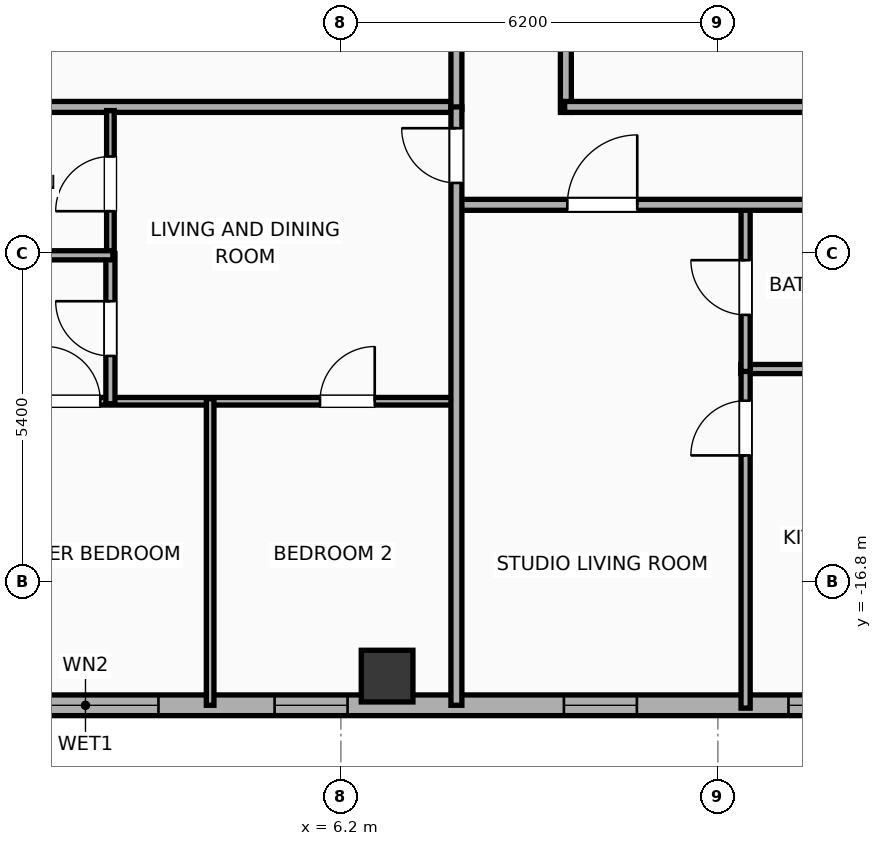
"""IFC4 building model, lengths in metres.
Left out: names, types, materials, properties, quantities, classifications, styles, units other than length and angle.
Written with IfcOpenShell. Run it as: python <this file> out.ifc"""

import sys

from ifc_helpers import new_model, si_unit, direction, frame, frame_2d, origin, origin_2d, place, context, subcontext, project, spatial, rectangle, hollow_rectangle, extrude, element, fill, save


model = new_model("IFC4")
c1 = context("Model", 3, precision=1e-05, world=origin(), true_north=direction((0.0, 1.0)))
c2 = subcontext(c1, "Body", "Model", "MODEL_VIEW")
j1 = project(units=[si_unit("LENGTHUNIT", "METRE"), si_unit("PLANEANGLEUNIT", "RADIAN")], contexts=[c1])
p1 = place(None, origin())
s1 = spatial("IfcSite", under=j1, at=p1, CompositionType="ELEMENT")
p2 = place(p1, origin())
s2 = spatial("IfcBuilding", under=s1, at=p2, CompositionType="ELEMENT")
p3 = place(p2, frame((0.0, 0.0, 247.0)))
s3 = spatial("IfcBuildingStorey", under=s2, at=p3, CompositionType="ELEMENT", Elevation=247.0)
p4 = place(p3, frame((6.96, -18.35, 0.0), z_axis=(0.0, 0.0, 1.0), x_axis=(1.0, 0.0, 0.0)))
e1 = element("IfcColumn", 1, at=p4, inside=s3, PredefinedType="COLUMN", context=c2, shape_type="SweptSolid", body=[
    extrude(hollow_rectangle(XDim=0.85, YDim=0.85, WallThickness=0.028, at=origin_2d()), origin(), (0.0, 0.0, 1.0), 3.9),
])
p5 = place(p3, frame((26.783, -18.83, 0.0), z_axis=(0.0, 0.0, 1.0), x_axis=(-1.0, 0.0, 0.0)))
e2 = element("IfcWall", 2, at=p5, inside=s3, PredefinedType="ELEMENTEDWALL", context=c2, shape_type="SweptSolid", body=[
    extrude(rectangle(XDim=49.566, YDim=0.34, at=frame_2d((24.783, 0.0))), origin(), (0.0, 0.0, 1.0), 3.65),
])
p6 = place(p5, frame((23.583, 0.0, 0.75)))
e3 = element("IfcOpeningElement", 3, at=p6, cuts=e2, PredefinedType="OPENING", context=c2, shape_type="SweptSolid", body=[
    extrude(rectangle(XDim=2.4, YDim=2.1, at=frame_2d((1.2, 1.05))), frame((0.0, 0.18, 0.0), z_axis=(0.0, -1.0, 0.0), x_axis=(1.0, 0.0, 0.0)), (0.0, 0.0, 1.0), 0.36),
])
p7 = place(p5, frame((41.756, 0.0, 0.75)))
e4 = element("IfcOpeningElement", 4, at=p7, cuts=e2, PredefinedType="OPENING", context=c2, shape_type="SweptSolid", body=[
    extrude(rectangle(XDim=2.4, YDim=2.1, at=frame_2d((1.2, 1.05))), frame((0.0, 0.18, 0.0), z_axis=(0.0, -1.0, 0.0), x_axis=(1.0, 0.0, 0.0)), (0.0, 0.0, 1.0), 0.36),
])
p8 = place(p5, frame((47.222, 0.0, 0.75)))
e5 = element("IfcOpeningElement", 5, at=p8, cuts=e2, PredefinedType="OPENING", context=c2, shape_type="SweptSolid", body=[
    extrude(rectangle(XDim=1.2, YDim=2.05, at=frame_2d((0.6, 1.025))), frame((0.0, 0.18, 0.0), z_axis=(0.0, -1.0, 0.0), x_axis=(1.0, 0.0, 0.0)), (0.0, 0.0, 1.0), 0.36),
])
p9 = place(p5, frame((45.131, 0.0, 0.75)))
e6 = element("IfcOpeningElement", 6, at=p9, cuts=e2, PredefinedType="OPENING", context=c2, shape_type="SweptSolid", body=[
    extrude(rectangle(XDim=1.2, YDim=2.05, at=frame_2d((0.6, 1.025))), frame((0.0, 0.18, 0.0), z_axis=(0.0, -1.0, 0.0), x_axis=(1.0, 0.0, 0.0)), (0.0, 0.0, 1.0), 0.36),
])
p10 = place(p5, frame((37.289, 0.0, 0.75)))
e7 = element("IfcOpeningElement", 7, at=p10, cuts=e2, PredefinedType="OPENING", context=c2, shape_type="SweptSolid", body=[
    extrude(rectangle(XDim=1.2, YDim=2.05, at=frame_2d((0.6, 1.025))), frame((0.0, 0.18, 0.0), z_axis=(0.0, -1.0, 0.0), x_axis=(1.0, 0.0, 0.0)), (0.0, 0.0, 1.0), 0.36),
])
p11 = place(p5, frame((15.715, 0.0, 0.75)))
e8 = element("IfcOpeningElement", 8, at=p11, cuts=e2, PredefinedType="OPENING", context=c2, shape_type="SweptSolid", body=[
    extrude(rectangle(XDim=1.2, YDim=2.05, at=frame_2d((0.6, 1.025))), frame((0.0, 0.18, 0.0), z_axis=(0.0, -1.0, 0.0), x_axis=(1.0, 0.0, 0.0)), (0.0, 0.0, 1.0), 0.36),
])
p12 = place(p5, frame((12.022, 0.0, 0.75)))
e9 = element("IfcOpeningElement", 9, at=p12, cuts=e2, PredefinedType="OPENING", context=c2, shape_type="SweptSolid", body=[
    extrude(rectangle(XDim=1.2, YDim=2.05, at=frame_2d((0.6, 1.025))), frame((0.0, 0.18, 0.0), z_axis=(0.0, -1.0, 0.0), x_axis=(1.0, 0.0, 0.0)), (0.0, 0.0, 1.0), 0.36),
])
p13 = place(p5, frame((8.09, 0.0, 0.75)))
e10 = element("IfcOpeningElement", 10, at=p13, cuts=e2, PredefinedType="OPENING", context=c2, shape_type="SweptSolid", body=[
    extrude(rectangle(XDim=1.2, YDim=2.05, at=frame_2d((0.6, 1.025))), frame((0.0, 0.18, 0.0), z_axis=(0.0, -1.0, 0.0), x_axis=(1.0, 0.0, 0.0)), (0.0, 0.0, 1.0), 0.36),
])
p14 = place(p5, frame((4.637, 0.0, 0.75)))
e11 = element("IfcOpeningElement", 11, at=p14, cuts=e2, PredefinedType="OPENING", context=c2, shape_type="SweptSolid", body=[
    extrude(rectangle(XDim=1.2, YDim=2.05, at=frame_2d((0.6, 1.025))), frame((0.0, 0.18, 0.0), z_axis=(0.0, -1.0, 0.0), x_axis=(1.0, 0.0, 0.0)), (0.0, 0.0, 1.0), 0.36),
])
p15 = place(p5, frame((1.811, 0.0, 0.75)))
e12 = element("IfcOpeningElement", 12, at=p15, cuts=e2, PredefinedType="OPENING", context=c2, shape_type="SweptSolid", body=[
    extrude(rectangle(XDim=1.2, YDim=2.05, at=frame_2d((0.6, 1.025))), frame((0.0, 0.18, 0.0), z_axis=(0.0, -1.0, 0.0), x_axis=(1.0, 0.0, 0.0)), (0.0, 0.0, 1.0), 0.36),
])
p16 = place(p5, frame((32.253, 0.0, 0.75)))
e13 = element("IfcOpeningElement", 13, at=p16, cuts=e2, PredefinedType="OPENING", context=c2, shape_type="SweptSolid", body=[
    extrude(rectangle(XDim=1.2, YDim=2.05, at=frame_2d((0.6, 1.025))), frame((0.0, 0.18, 0.0), z_axis=(0.0, -1.0, 0.0), x_axis=(1.0, 0.0, 0.0)), (0.0, 0.0, 1.0), 0.36),
])
p17 = place(p5, frame((27.853, 0.0, 0.75)))
e14 = element("IfcOpeningElement", 14, at=p17, cuts=e2, PredefinedType="OPENING", context=c2, shape_type="SweptSolid", body=[
    extrude(rectangle(XDim=1.2, YDim=2.05, at=frame_2d((0.6, 1.025))), frame((0.0, 0.18, 0.0), z_axis=(0.0, -1.0, 0.0), x_axis=(1.0, 0.0, 0.0)), (0.0, 0.0, 1.0), 0.36),
])
p18 = place(p5, frame((20.473, 0.0, 0.75)))
e15 = element("IfcOpeningElement", 15, at=p18, cuts=e2, PredefinedType="OPENING", context=c2, shape_type="SweptSolid", body=[
    extrude(rectangle(XDim=1.2, YDim=2.05, at=frame_2d((0.6, 1.025))), frame((0.0, 0.18, 0.0), z_axis=(0.0, -1.0, 0.0), x_axis=(1.0, 0.0, 0.0)), (0.0, 0.0, 1.0), 0.36),
])
p19 = place(p3, frame((9.9, -9.08, 0.0), z_axis=(0.0, 0.0, 1.0), x_axis=(0.0, 1.0, 0.0)))
e16 = element("IfcWall", 16, at=p19, inside=s3, PredefinedType="PARTITIONING", context=c2, shape_type="SweptSolid", body=[
    extrude(rectangle(XDim=18.16, YDim=0.18, at=frame_2d((9.08, 0.0))), origin(), (0.0, 0.0, 1.0), 3.65),
])
p20 = place(p19, frame((7.622, 0.0, 0.0)))
e17 = element("IfcOpeningElement", 17, at=p20, cuts=e16, PredefinedType="OPENING", context=c2, shape_type="SweptSolid", body=[
    extrude(rectangle(XDim=1.1, YDim=2.05, at=frame_2d((0.55, 1.025))), frame((0.0, 0.1, 0.0), z_axis=(0.0, -1.0, 0.0), x_axis=(1.0, 0.0, 0.0)), (0.0, 0.0, 1.0), 0.2),
])
p21 = place(p3, frame((9.88, -8.99, 0.0), z_axis=(0.0, 0.0, 1.0), x_axis=(1.0, 0.0, 0.0)))
e18 = element("IfcWall", 18, at=p21, inside=s3, PredefinedType="PARTITIONING", context=c2, shape_type="SweptSolid", body=[
    extrude(rectangle(XDim=20.35, YDim=0.18, at=frame_2d((10.175, 0.0))), origin(), (0.0, 0.0, 1.0), 3.65),
])
p22 = place(p3, frame((-8.15, -8.99, 0.0), z_axis=(0.0, 0.0, 1.0), x_axis=(1.0, 0.0, 0.0)))
e19 = element("IfcWall", 19, at=p22, inside=s3, PredefinedType="PARTITIONING", context=c2, shape_type="SweptSolid", body=[
    extrude(rectangle(XDim=16.3, YDim=0.18, at=frame_2d((8.15, 0.0))), origin(), (0.0, 0.0, 1.0), 3.65),
])
p23 = place(p3, frame((8.1, -9.03, 0.0), z_axis=(0.0, 0.0, 1.0), x_axis=(0.0, 1.0, 0.0)))
e20 = element("IfcWall", 20, at=p23, inside=s3, PredefinedType="PARTITIONING", context=c2, shape_type="SweptSolid", body=[
    extrude(rectangle(XDim=18.06, YDim=0.18, at=frame_2d((9.03, 0.0))), origin(), (0.0, 0.0, 1.0), 3.65),
])
p24 = place(p3, frame((12.776, -13.3, 0.0), z_axis=(0.0, 0.0, 1.0), x_axis=(1.0, 0.0, 0.0)))
e21 = element("IfcWall", 21, at=p24, inside=s3, PredefinedType="PLUMBINGWALL", context=c2, shape_type="SweptSolid", body=[
    extrude(rectangle(XDim=2.95, YDim=0.15, at=frame_2d((1.475, 0.0))), origin(), (0.0, 0.0, 1.0), 3.65),
])
p25 = place(p3, frame((12.856, -18.877, 0.0), z_axis=(0.0, 0.0, 1.0), x_axis=(0.0, 1.0, 0.0)))
e22 = element("IfcWall", 22, at=p25, inside=s3, PredefinedType="PLUMBINGWALL", context=c2, shape_type="SweptSolid", body=[
    extrude(rectangle(XDim=5.617, YDim=0.15, at=frame_2d((2.808, 0.0))), origin(), (0.0, 0.0, 1.0), 3.65),
])
p26 = place(p25, frame((4.156, 0.0, 0.0)))
e23 = element("IfcOpeningElement", 23, at=p26, cuts=e22, PredefinedType="OPENING", context=c2, shape_type="SweptSolid", body=[
    extrude(rectangle(XDim=0.9, YDim=2.05, at=frame_2d((0.45, 1.025))), frame((0.0, 0.085, 0.0), z_axis=(0.0, -1.0, 0.0), x_axis=(1.0, 0.0, 0.0)), (0.0, 0.0, 1.0), 0.17),
])
p27 = place(p3, frame((12.856, -13.34, 0.0), z_axis=(0.0, 0.0, 1.0), x_axis=(0.0, 1.0, 0.0)))
e24 = element("IfcWall", 24, at=p27, inside=s3, PredefinedType="PLUMBINGWALL", context=c2, shape_type="SweptSolid", body=[
    extrude(rectangle(XDim=2.76, YDim=0.15, at=frame_2d((1.38, 0.0))), origin(), (0.0, 0.0, 1.0), 3.65),
])
p28 = place(p27, frame((0.93, 0.0, 0.0)))
e25 = element("IfcOpeningElement", 25, at=p28, cuts=e24, PredefinedType="OPENING", context=c2, shape_type="SweptSolid", body=[
    extrude(rectangle(XDim=0.9, YDim=2.05, at=frame_2d((0.45, 1.025))), frame((0.0, 0.085, 0.0), z_axis=(0.0, -1.0, 0.0), x_axis=(1.0, 0.0, 0.0)), (0.0, 0.0, 1.0), 0.17),
])
p29 = place(p3, frame((8.08, -10.6, 0.0), z_axis=(0.0, 0.0, 1.0), x_axis=(1.0, 0.0, 0.0)))
e26 = element("IfcWall", 26, at=p29, inside=s3, PredefinedType="PARTITIONING", context=c2, shape_type="SweptSolid", body=[
    extrude(rectangle(XDim=22.15, YDim=0.18, at=frame_2d((11.075, 0.0))), origin(), (0.0, 0.0, 1.0), 3.65),
])
p30 = place(p29, frame((1.844, 0.0, 0.0)))
e27 = element("IfcOpeningElement", 27, at=p30, cuts=e26, PredefinedType="OPENING", context=c2, shape_type="SweptSolid", body=[
    extrude(rectangle(XDim=1.15, YDim=2.05, at=frame_2d((0.575, 1.025))), frame((0.0, 0.1, 0.0), z_axis=(0.0, -1.0, 0.0), x_axis=(1.0, 0.0, 0.0)), (0.0, 0.0, 1.0), 0.2),
])
p31 = place(p29, frame((9.229, 0.0, 0.0)))
e28 = element("IfcOpeningElement", 28, at=p31, cuts=e26, PredefinedType="OPENING", context=c2, shape_type="SweptSolid", body=[
    extrude(rectangle(XDim=1.15, YDim=2.05, at=frame_2d((0.575, 1.025))), frame((0.0, 0.1, 0.0), z_axis=(0.0, -1.0, 0.0), x_axis=(1.0, 0.0, 0.0)), (0.0, 0.0, 1.0), 0.2),
])
p32 = place(p29, frame((18.191, 0.0, 0.0)))
e29 = element("IfcOpeningElement", 29, at=p32, cuts=e26, PredefinedType="OPENING", context=c2, shape_type="SweptSolid", body=[
    extrude(rectangle(XDim=0.9, YDim=2.05, at=frame_2d((0.45, 1.025))), frame((0.0, 0.1, 0.0), z_axis=(0.0, -1.0, 0.0), x_axis=(1.0, 0.0, 0.0)), (0.0, 0.0, 1.0), 0.2),
])
p33 = place(p3, frame((0.02, -13.83, 0.0), z_axis=(0.0, 0.0, 1.0), x_axis=(1.0, 0.0, 0.0)))
e30 = element("IfcWall", 30, at=p33, inside=s3, PredefinedType="PARTITIONING", context=c2, shape_type="SweptSolid", body=[
    extrude(rectangle(XDim=8.06, YDim=0.125, at=frame_2d((4.03, 0.0))), origin(), (0.0, 0.0, 1.0), 3.65),
])
p34 = place(p33, frame((1.323, 0.0, 0.0)))
e31 = element("IfcOpeningElement", 31, at=p34, cuts=e30, PredefinedType="OPENING", context=c2, shape_type="SweptSolid", body=[
    extrude(rectangle(XDim=0.9, YDim=2.05, at=frame_2d((0.45, 1.025))), frame((0.0, 0.073, 0.0), z_axis=(0.0, -1.0, 0.0), x_axis=(1.0, 0.0, 0.0)), (0.0, 0.0, 1.0), 0.145),
])
p35 = place(p33, frame((5.837, 0.0, 0.0)))
e32 = element("IfcOpeningElement", 32, at=p35, cuts=e30, PredefinedType="OPENING", context=c2, shape_type="SweptSolid", body=[
    extrude(rectangle(XDim=0.9, YDim=2.05, at=frame_2d((0.45, 1.025))), frame((0.0, 0.073, 0.0), z_axis=(0.0, -1.0, 0.0), x_axis=(1.0, 0.0, 0.0)), (0.0, 0.0, 1.0), 0.145),
])
p36 = place(p3, frame((2.41, -11.46, 0.0), z_axis=(0.0, 0.0, 1.0), x_axis=(0.0, 1.0, 0.0)))
e33 = element("IfcWall", 33, at=p36, inside=s3, PredefinedType="PARTITIONING", context=c2, shape_type="SweptSolid", body=[
    extrude(rectangle(XDim=2.41, YDim=0.125, at=frame_2d((1.205, 0.0))), origin(), (0.0, 0.0, 1.0), 3.65),
])
p37 = place(p36, frame((0.755, 0.0, 0.0)))
e34 = element("IfcOpeningElement", 34, at=p37, cuts=e33, PredefinedType="OPENING", context=c2, shape_type="SweptSolid", body=[
    extrude(rectangle(XDim=0.9, YDim=2.05, at=frame_2d((0.45, 1.025))), frame((0.0, 0.073, 0.0), z_axis=(0.0, -1.0, 0.0), x_axis=(1.0, 0.0, 0.0)), (0.0, 0.0, 1.0), 0.145),
])
p38 = place(p3, frame((2.41, -13.87, 0.0), z_axis=(0.0, 0.0, 1.0), x_axis=(0.0, 1.0, 0.0)))
e35 = element("IfcWall", 35, at=p38, inside=s3, PredefinedType="PLUMBINGWALL", context=c2, shape_type="SweptSolid", body=[
    extrude(rectangle(XDim=2.47, YDim=0.15, at=frame_2d((1.235, 0.0))), origin(), (0.0, 0.0, 1.0), 3.65),
])
p39 = place(p38, frame((0.785, 0.0, 0.0)))
e36 = element("IfcOpeningElement", 36, at=p39, cuts=e35, PredefinedType="OPENING", context=c2, shape_type="SweptSolid", body=[
    extrude(rectangle(XDim=0.9, YDim=2.05, at=frame_2d((0.45, 1.025))), frame((0.0, 0.085, 0.0), z_axis=(0.0, -1.0, 0.0), x_axis=(1.0, 0.0, 0.0)), (0.0, 0.0, 1.0), 0.17),
])
p40 = place(p3, frame((0.02, -11.43, 0.0), z_axis=(0.0, 0.0, 1.0), x_axis=(1.0, 0.0, 0.0)))
e37 = element("IfcWall", 37, at=p40, inside=s3, PredefinedType="PLUMBINGWALL", context=c2, shape_type="SweptSolid", body=[
    extrude(rectangle(XDim=2.43, YDim=0.15, at=frame_2d((1.215, 0.0))), origin(), (0.0, 0.0, 1.0), 3.65),
])
p41 = place(p3, frame((4.05, -18.83, 0.0), z_axis=(0.0, 0.0, 1.0), x_axis=(0.0, 1.0, 0.0)))
e38 = element("IfcWall", 38, at=p41, inside=s3, PredefinedType="PARTITIONING", context=c2, shape_type="SweptSolid", body=[
    extrude(rectangle(XDim=5.04, YDim=0.125, at=frame_2d((2.52, 0.0))), origin(), (0.0, 0.0, 1.0), 3.65),
])
p42 = place(p3, frame((8.1, -18.83, 0.0), z_axis=(0.0, 0.0, 1.0), x_axis=(0.0, 1.0, 0.0)))
e39 = element("IfcWall", 39, at=p42, inside=s3, PredefinedType="PARTITIONING", context=c2, shape_type="SweptSolid", body=[
    extrude(rectangle(XDim=9.84, YDim=0.18, at=frame_2d((4.92, 0.0))), origin(), (0.0, 0.0, 1.0), 3.65),
])
p43 = place(p42, frame((8.59, 0.0, 0.0)))
e40 = element("IfcOpeningElement", 40, at=p43, cuts=e39, PredefinedType="OPENING", context=c2, shape_type="SweptSolid", body=[
    extrude(rectangle(XDim=0.9, YDim=2.05, at=frame_2d((0.45, 1.025))), frame((0.0, 0.1, 0.0), z_axis=(0.0, -1.0, 0.0), x_axis=(1.0, 0.0, 0.0)), (0.0, 0.0, 1.0), 0.2),
])
p44 = place(p6, origin())
e41 = element("IfcWindow", 41, at=p44, inside=s3, PartitioningType="SINGLE_PANEL", PredefinedType="WINDOW", context=c2, shape_type="SweptSolid", body=[
    extrude(rectangle(XDim=2.4, YDim=2.1, at=frame_2d((1.2, 1.05))), frame((0.0, 0.03, 0.0), z_axis=(0.0, -1.0, 0.0), x_axis=(1.0, 0.0, 0.0)), (0.0, 0.0, 1.0), 0.06),
])
fill(e3, e41)
p45 = place(p11, origin())
e42 = element("IfcWindow", 42, at=p45, inside=s3, PartitioningType="SINGLE_PANEL", PredefinedType="WINDOW", context=c2, shape_type="SweptSolid", body=[
    extrude(rectangle(XDim=1.2, YDim=2.05, at=frame_2d((0.6, 1.025))), frame((0.0, 0.03, 0.0), z_axis=(0.0, -1.0, 0.0), x_axis=(1.0, 0.0, 0.0)), (0.0, 0.0, 1.0), 0.06),
])
fill(e8, e42)
p46 = place(p12, origin())
e43 = element("IfcWindow", 43, at=p46, inside=s3, PartitioningType="SINGLE_PANEL", PredefinedType="WINDOW", context=c2, shape_type="SweptSolid", body=[
    extrude(rectangle(XDim=1.2, YDim=2.05, at=frame_2d((0.6, 1.025))), frame((0.0, 0.03, 0.0), z_axis=(0.0, -1.0, 0.0), x_axis=(1.0, 0.0, 0.0)), (0.0, 0.0, 1.0), 0.06),
])
fill(e9, e43)
p47 = place(p18, origin())
e44 = element("IfcWindow", 44, at=p47, inside=s3, PartitioningType="SINGLE_PANEL", PredefinedType="WINDOW", context=c2, shape_type="SweptSolid", body=[
    extrude(rectangle(XDim=1.2, YDim=2.05, at=frame_2d((0.6, 1.025))), frame((0.0, 0.03, 0.0), z_axis=(0.0, -1.0, 0.0), x_axis=(1.0, 0.0, 0.0)), (0.0, 0.0, 1.0), 0.06),
])
fill(e15, e44)
p48 = place(p26, origin())
e45 = element("IfcDoor", 45, at=p48, inside=s3, OperationType="SINGLE_SWING_LEFT", PredefinedType="DOOR", context=c2, shape_type="SweptSolid", body=[
    extrude(rectangle(XDim=0.9, YDim=2.05, at=frame_2d((0.45, 1.025))), frame((0.0, 0.025, 0.0), z_axis=(0.0, -1.0, 0.0), x_axis=(1.0, 0.0, 0.0)), (0.0, 0.0, 1.0), 0.05),
])
fill(e23, e45)
p49 = place(p28, origin())
e46 = element("IfcDoor", 46, at=p49, inside=s3, OperationType="SINGLE_SWING_RIGHT", PredefinedType="DOOR", context=c2, shape_type="SweptSolid", body=[
    extrude(rectangle(XDim=0.9, YDim=2.05, at=frame_2d((0.45, 1.025))), frame((0.0, 0.025, 0.0), z_axis=(0.0, -1.0, 0.0), x_axis=(1.0, 0.0, 0.0)), (0.0, 0.0, 1.0), 0.05),
])
fill(e25, e46)
p50 = place(p30, origin())
e47 = element("IfcDoor", 47, at=p50, inside=s3, OperationType="SINGLE_SWING_RIGHT", PredefinedType="DOOR", context=c2, shape_type="SweptSolid", body=[
    extrude(rectangle(XDim=1.15, YDim=2.05, at=frame_2d((0.575, 1.025))), frame((0.0, 0.025, 0.0), z_axis=(0.0, -1.0, 0.0), x_axis=(1.0, 0.0, 0.0)), (0.0, 0.0, 1.0), 0.05),
])
fill(e27, e47)
p51 = place(p34, origin())
e48 = element("IfcDoor", 48, at=p51, inside=s3, OperationType="SINGLE_SWING_LEFT", PredefinedType="DOOR", context=c2, shape_type="SweptSolid", body=[
    extrude(rectangle(XDim=0.9, YDim=2.05, at=frame_2d((0.45, 1.025))), frame((0.0, 0.025, 0.0), z_axis=(0.0, -1.0, 0.0), x_axis=(1.0, 0.0, 0.0)), (0.0, 0.0, 1.0), 0.05),
])
fill(e31, e48)
p52 = place(p35, origin())
e49 = element("IfcDoor", 49, at=p52, inside=s3, OperationType="SINGLE_SWING_RIGHT", PredefinedType="DOOR", context=c2, shape_type="SweptSolid", body=[
    extrude(rectangle(XDim=0.9, YDim=2.05, at=frame_2d((0.45, 1.025))), frame((0.0, 0.025, 0.0), z_axis=(0.0, -1.0, 0.0), x_axis=(1.0, 0.0, 0.0)), (0.0, 0.0, 1.0), 0.05),
])
fill(e32, e49)
p53 = place(p37, origin())
e50 = element("IfcDoor", 50, at=p53, inside=s3, OperationType="SINGLE_SWING_LEFT", PredefinedType="DOOR", context=c2, shape_type="SweptSolid", body=[
    extrude(rectangle(XDim=0.9, YDim=2.05, at=frame_2d((0.45, 1.025))), frame((0.0, 0.025, 0.0), z_axis=(0.0, -1.0, 0.0), x_axis=(1.0, 0.0, 0.0)), (0.0, 0.0, 1.0), 0.05),
])
fill(e34, e50)
p54 = place(p39, origin())
e51 = element("IfcDoor", 51, at=p54, inside=s3, OperationType="SINGLE_SWING_RIGHT", PredefinedType="DOOR", context=c2, shape_type="SweptSolid", body=[
    extrude(rectangle(XDim=0.9, YDim=2.05, at=frame_2d((0.45, 1.025))), frame((0.0, 0.025, 0.0), z_axis=(0.0, -1.0, 0.0), x_axis=(1.0, 0.0, 0.0)), (0.0, 0.0, 1.0), 0.05),
])
fill(e36, e51)
p55 = place(p43, origin())
e52 = element("IfcDoor", 52, at=p55, inside=s3, OperationType="SINGLE_SWING_RIGHT", PredefinedType="DOOR", context=c2, shape_type="SweptSolid", body=[
    extrude(rectangle(XDim=0.9, YDim=2.05, at=frame_2d((0.45, 1.025))), frame((0.0, 0.025, 0.0), z_axis=(0.0, -1.0, 0.0), x_axis=(1.0, 0.0, 0.0)), (0.0, 0.0, 1.0), 0.05),
])
fill(e40, e52)
save(model, sys.argv[1])
